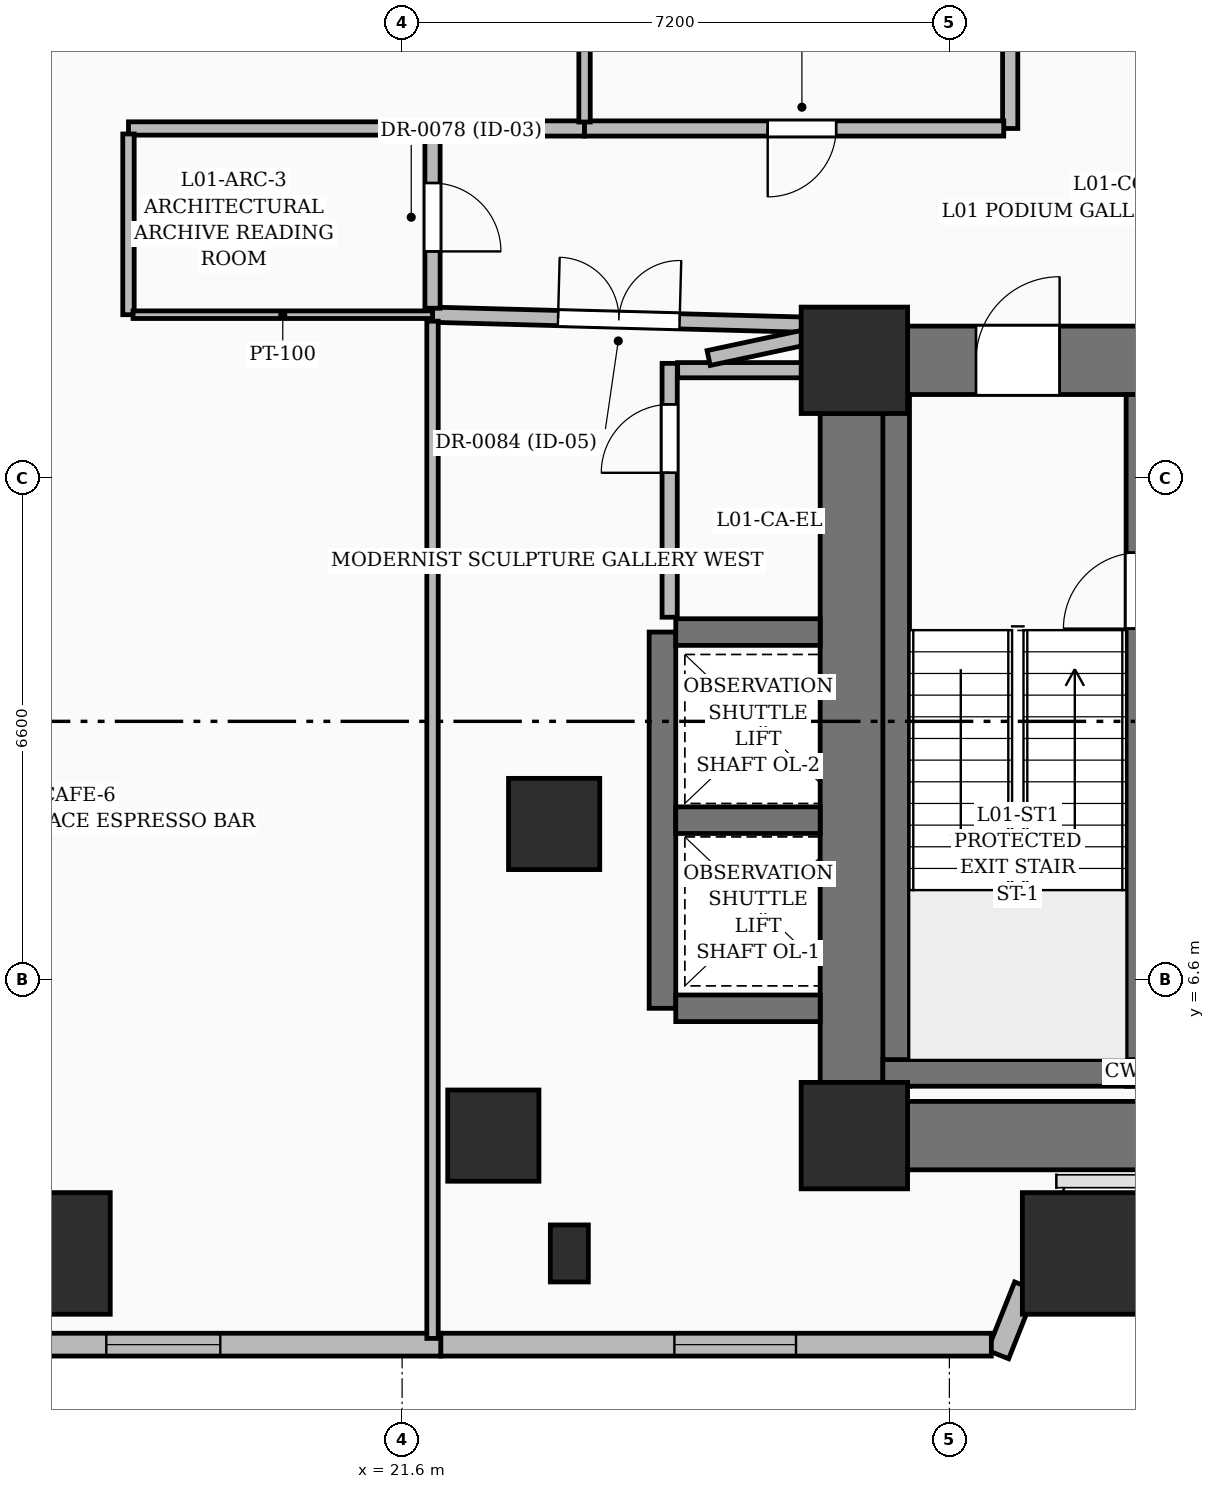
"""IFC4 building model, lengths in metres.
Left out: names, types, materials, properties, quantities, classifications, styles, units other than length and angle.
Written with IfcOpenShell. Run it as: python <this file> out.ifc"""

import sys

from ifc_helpers import new_model, si_unit, direction, frame, frame_2d, origin, origin_2d, place, context, subcontext, project, spatial, rectangle, extrude, element, fill, save


model = new_model("IFC4")
c1 = context("Model", 3, precision=1e-05, world=origin(), true_north=direction((0.0, 1.0)))
c2 = subcontext(c1, "Body", "Model", "MODEL_VIEW")
j1 = project(units=[si_unit("LENGTHUNIT", "METRE"), si_unit("PLANEANGLEUNIT", "RADIAN")], contexts=[c1])
p1 = place(None, origin())
s1 = spatial("IfcSite", under=j1, at=p1, CompositionType="ELEMENT")
p2 = place(p1, origin())
s2 = spatial("IfcBuilding", under=s1, at=p2, CompositionType="ELEMENT")
p3 = place(p2, frame((0.0, 0.0, 8.4)))
s3 = spatial("IfcBuildingStorey", under=s2, at=p3, CompositionType="ELEMENT", Elevation=8.4)
for number, where, z_axis, x_axis in (
    (1, (27.55, 4.55, 0.0), (0.0, 0.0, 1.0), (1.0, 0.0, 0.0)),
    (2, (27.55, 14.75, 0.0), (0.0, 0.0, 1.0), (1.0, 0.0, 0.0)),
):
    element("IfcColumn", number, at=place(p3, frame(where, z_axis=z_axis, x_axis=x_axis)), inside=s3, PredefinedType="COLUMN", context=c2, shape_type="SweptSolid", body=[
        extrude(rectangle(XDim=1.4, YDim=1.4, at=origin_2d()), origin(), (0.0, 0.0, 1.0), 4.5),
    ])
for number, where, z_axis, x_axis in (
    (3, (22.8, 4.55, 0.0), (0.0, 0.0, 1.0), (1.0, 0.0, 0.0)),
    (4, (23.6, 8.65, 0.0), (0.0, 0.0, 1.0), (1.0, 0.0, 0.0)),
):
    element("IfcColumn", number, at=place(p3, frame(where, z_axis=z_axis, x_axis=x_axis)), inside=s3, PredefinedType="COLUMN", context=c2, shape_type="SweptSolid", body=[
        extrude(rectangle(XDim=1.2, YDim=1.2, at=origin_2d()), origin(), (0.0, 0.0, 1.0), 4.5),
    ])
p4 = place(p3, frame((28.25, 4.55, 0.0), z_axis=(0.0, 0.0, 1.0), x_axis=(1.0, 0.0, 0.0)))
e5 = element("IfcWall", 5, at=p4, inside=s3, PredefinedType="SHEAR", context=c2, shape_type="SweptSolid", body=[
    extrude(rectangle(XDim=6.2, YDim=0.9, at=frame_2d((3.1, 0.0))), origin(), (0.0, 0.0, 1.0), 4.5),
])
p5 = place(p3, frame((28.25, 14.75, 0.0), z_axis=(0.0, 0.0, 1.0), x_axis=(1.0, 0.0, 0.0)))
e6 = element("IfcWall", 6, at=p5, inside=s3, PredefinedType="SHEAR", context=c2, shape_type="SweptSolid", body=[
    extrude(rectangle(XDim=6.2, YDim=0.9, at=frame_2d((3.1, 0.0))), origin(), (0.0, 0.0, 1.0), 4.5),
])
p6 = place(p5, frame((0.9, 0.0, 0.0)))
e7 = element("IfcOpeningElement", 7, at=p6, cuts=e6, PredefinedType="OPENING", context=c2, shape_type="SweptSolid", body=[
    extrude(rectangle(XDim=1.1, YDim=2.2, at=frame_2d((0.55, 1.1))), frame((0.0, 0.46, 0.0), z_axis=(0.0, -1.0, 0.0), x_axis=(1.0, 0.0, 0.0)), (0.0, 0.0, 1.0), 0.92),
])
p7 = place(p3, frame((27.55, 5.25, 0.0), z_axis=(0.0, 0.0, 1.0), x_axis=(0.0, 1.0, 0.0)))
e8 = element("IfcWall", 8, at=p7, inside=s3, PredefinedType="SHEAR", context=c2, shape_type="SweptSolid", body=[
    extrude(rectangle(XDim=8.8, YDim=0.9, at=frame_2d((4.4, 0.0))), origin(), (0.0, 0.0, 1.0), 4.5),
])
p8 = place(p3, frame((28.1, 5.2, 0.0), z_axis=(0.0, 0.0, 1.0), x_axis=(0.0, 1.0, 0.0)))
e9 = element("IfcWall", 9, at=p8, inside=s3, PredefinedType="SOLIDWALL", context=c2, shape_type="SweptSolid", body=[
    extrude(rectangle(XDim=9.1, YDim=0.35, at=frame_2d((4.55, 0.0))), origin(), (0.0, 0.0, 1.0), 4.5),
])
p9 = place(p3, frame((31.3, 5.2, 0.0), z_axis=(0.0, 0.0, 1.0), x_axis=(0.0, 1.0, 0.0)))
e10 = element("IfcWall", 10, at=p9, inside=s3, PredefinedType="SOLIDWALL", context=c2, shape_type="SweptSolid", body=[
    extrude(rectangle(XDim=9.1, YDim=0.35, at=frame_2d((4.55, 0.0))), origin(), (0.0, 0.0, 1.0), 4.5),
])
p10 = place(p9, frame((6.02, 0.0, 0.0)))
e11 = element("IfcOpeningElement", 11, at=p10, cuts=e10, PredefinedType="OPENING", context=c2, shape_type="SweptSolid", body=[
    extrude(rectangle(XDim=1.0, YDim=2.15, at=frame_2d((0.5, 1.075))), frame((0.0, 0.185, 0.0), z_axis=(0.0, -1.0, 0.0), x_axis=(1.0, 0.0, 0.0)), (0.0, 0.0, 1.0), 0.37),
])
p11 = place(p3, frame((27.925, 5.375, 0.0), z_axis=(0.0, 0.0, 1.0), x_axis=(1.0, 0.0, 0.0)))
e12 = element("IfcWall", 12, at=p11, inside=s3, PredefinedType="SOLIDWALL", context=c2, shape_type="SweptSolid", body=[
    extrude(rectangle(XDim=3.55, YDim=0.35, at=frame_2d((1.775, 0.0))), origin(), (0.0, 0.0, 1.0), 4.5),
])
p12 = place(p3, frame((25.025, 6.225, 0.0), z_axis=(0.0, 0.0, 1.0), x_axis=(0.0, 1.0, 0.0)))
e13 = element("IfcWall", 13, at=p12, inside=s3, PredefinedType="SOLIDWALL", context=c2, shape_type="SweptSolid", body=[
    extrude(rectangle(XDim=4.95, YDim=0.35, at=frame_2d((2.475, 0.0))), origin(), (0.0, 0.0, 1.0), 4.5),
])
for number, where, z_axis, x_axis in (
    (14, (25.2, 6.225, 0.0), (0.0, 0.0, 1.0), (1.0, 0.0, 0.0)),
    (15, (25.2, 8.7, 0.0), (0.0, 0.0, 1.0), (1.0, 0.0, 0.0)),
    (16, (25.2, 11.175, 0.0), (0.0, 0.0, 1.0), (1.0, 0.0, 0.0)),
):
    element("IfcWall", number, at=place(p3, frame(where, z_axis=z_axis, x_axis=x_axis)), inside=s3, PredefinedType="SOLIDWALL", context=c2, shape_type="SweptSolid", body=[
        extrude(rectangle(XDim=1.9, YDim=0.35, at=frame_2d((0.95, 0.0))), origin(), (0.0, 0.0, 1.0), 4.5),
    ])
for number, where, z_axis, x_axis in (
    (17, (16.96, 3.0, 0.0), (0.0, 0.0, 1.0), (1.0, 0.0, 0.0)),
    (18, (30.56, 3.0, 0.0), (0.0, 0.0, 1.0), (1.0, 0.0, 0.0)),
):
    element("IfcColumn", number, at=place(p3, frame(where, z_axis=z_axis, x_axis=x_axis)), inside=s3, PredefinedType="COLUMN", context=c2, shape_type="SweptSolid", body=[
        extrude(rectangle(XDim=1.6, YDim=1.6, at=origin_2d()), origin(), (0.0, 0.0, 1.0), 4.5),
    ])
p13 = place(p3, frame((23.8, 3.0, 0.0), z_axis=(0.0, 0.0, 1.0), x_axis=(1.0, 0.0, 0.0)))
e19 = element("IfcColumn", 19, at=p13, inside=s3, PredefinedType="PILASTER", context=c2, shape_type="SweptSolid", body=[
    extrude(rectangle(XDim=0.5, YDim=0.75, at=origin_2d()), origin(), (0.0, 0.0, 1.0), 4.5),
])
p14 = place(p3, frame((29.798, 2.57, 0.0), z_axis=(0.0, 0.0, 1.0), x_axis=(-0.369651063385, -0.929170647049, 0.0)))
e20 = element("IfcWall", 20, at=p14, inside=s3, PredefinedType="SOLIDWALL", context=c2, shape_type="SweptSolid", body=[
    extrude(rectangle(XDim=0.968, YDim=0.3, at=frame_2d((0.484, 0.0))), origin(), (0.0, 0.0, 1.0), 4.2),
])
p15 = place(p3, frame((29.352, 1.8, 0.0), z_axis=(0.0, 0.0, 1.0), x_axis=(-1.0, 0.0, 0.0)))
e21 = element("IfcWall", 21, at=p15, inside=s3, PredefinedType="SOLIDWALL", context=c2, shape_type="SweptSolid", body=[
    extrude(rectangle(XDim=7.244, YDim=0.3, at=frame_2d((3.622, 0.0))), origin(), (0.0, 0.0, 1.0), 4.2),
])
p16 = place(p15, frame((2.57, 0.0, 0.55)))
e22 = element("IfcOpeningElement", 22, at=p16, cuts=e21, PredefinedType="OPENING", context=c2, shape_type="SweptSolid", body=[
    extrude(rectangle(XDim=1.6, YDim=2.2, at=frame_2d((0.8, 1.1))), frame((0.0, 0.16, 0.0), z_axis=(0.0, -1.0, 0.0), x_axis=(1.0, 0.0, 0.0)), (0.0, 0.0, 1.0), 0.32),
])
p17 = place(p3, frame((22.108, 1.8, 0.0), z_axis=(0.0, 0.0, 1.0), x_axis=(-1.0, 0.0, 0.0)))
e23 = element("IfcWall", 23, at=p17, inside=s3, PredefinedType="SOLIDWALL", context=c2, shape_type="SweptSolid", body=[
    extrude(rectangle(XDim=7.524, YDim=0.3, at=frame_2d((3.762, 0.0))), origin(), (0.0, 0.0, 1.0), 4.2),
])
p18 = place(p17, frame((2.9, 0.0, 0.6)))
e24 = element("IfcOpeningElement", 24, at=p18, cuts=e23, PredefinedType="OPENING", context=c2, shape_type="SweptSolid", body=[
    extrude(rectangle(XDim=1.5, YDim=2.1, at=frame_2d((0.75, 1.05))), frame((0.0, 0.16, 0.0), z_axis=(0.0, -1.0, 0.0), x_axis=(1.0, 0.0, 0.0)), (0.0, 0.0, 1.0), 0.32),
])
p19 = place(p3, frame((25.12, 11.37, 0.0), z_axis=(0.0, 0.0, 1.0), x_axis=(0.0, 1.0, 0.0)))
e25 = element("IfcWall", 25, at=p19, inside=s3, PredefinedType="PARTITIONING", context=c2, shape_type="SweptSolid", body=[
    extrude(rectangle(XDim=3.34, YDim=0.2, at=frame_2d((1.67, 0.0))), origin(), (0.0, 0.0, 1.0), 4.2),
])
p20 = place(p19, frame((1.9, 0.0, 0.0)))
e26 = element("IfcOpeningElement", 26, at=p20, cuts=e25, PredefinedType="OPENING", context=c2, shape_type="SweptSolid", body=[
    extrude(rectangle(XDim=0.9, YDim=2.1, at=frame_2d((0.45, 1.05))), frame((0.0, 0.11, 0.0), z_axis=(0.0, -1.0, 0.0), x_axis=(1.0, 0.0, 0.0)), (0.0, 0.0, 1.0), 0.22),
])
p21 = place(p3, frame((25.225, 14.62, 0.0), z_axis=(0.0, 0.0, 1.0), x_axis=(1.0, 0.0, 0.0)))
e27 = element("IfcWall", 27, at=p21, inside=s3, PredefinedType="PARTITIONING", context=c2, shape_type="SweptSolid", body=[
    extrude(rectangle(XDim=1.86, YDim=0.2, at=frame_2d((0.93, 0.0))), origin(), (0.0, 0.0, 1.0), 4.2),
])
p22 = place(p3, frame((22.0, 15.35, 0.0), z_axis=(0.0, 0.0, 1.0), x_axis=(0.999640767954, -0.02680177314, 0.0)))
e28 = element("IfcWall", 28, at=p22, inside=s3, PredefinedType="PARTITIONING", context=c2, shape_type="SweptSolid", body=[
    extrude(rectangle(XDim=5.602, YDim=0.2, at=frame_2d((2.801, 0.0))), origin(), (0.0, 0.0, 1.0), 3.078),
])
p23 = place(p22, frame((1.652, 0.0, 0.0)))
e29 = element("IfcOpeningElement", 29, at=p23, cuts=e28, PredefinedType="OPENING", context=c2, shape_type="SweptSolid", body=[
    extrude(rectangle(XDim=1.6, YDim=2.3, at=frame_2d((0.8, 1.15))), frame((0.0, 0.11, 0.0), z_axis=(0.0, -1.0, 0.0), x_axis=(1.0, 0.0, 0.0)), (0.0, 0.0, 1.0), 0.22),
])
p24 = place(p3, frame((22.0, 17.8, 0.0), z_axis=(0.0, 0.0, 1.0), x_axis=(0.0, -1.0, 0.0)))
e30 = element("IfcWall", 30, at=p24, inside=s3, PredefinedType="PARTITIONING", context=c2, shape_type="SweptSolid", body=[
    extrude(rectangle(XDim=2.365, YDim=0.2, at=frame_2d((1.183, 0.0))), origin(), (0.0, 0.0, 1.0), 3.621),
])
p25 = place(p24, frame((0.717, 0.0, 0.0)))
e31 = element("IfcOpeningElement", 31, at=p25, cuts=e30, PredefinedType="OPENING", context=c2, shape_type="SweptSolid", body=[
    extrude(rectangle(XDim=0.9, YDim=2.1, at=frame_2d((0.45, 1.05))), frame((0.0, 0.11, 0.0), z_axis=(0.0, -1.0, 0.0), x_axis=(1.0, 0.0, 0.0)), (0.0, 0.0, 1.0), 0.22),
])
p26 = place(p3, frame((24.0, 17.8, 0.0), z_axis=(0.0, 0.0, 1.0), x_axis=(-1.0, 0.0, 0.0)))
e32 = element("IfcWall", 32, at=p26, inside=s3, PredefinedType="PARTITIONING", context=c2, shape_type="SweptSolid", body=[
    extrude(rectangle(XDim=1.915, YDim=0.2, at=frame_2d((0.958, 0.0))), origin(), (0.0, 0.0, 1.0), 3.078),
])
p27 = place(p3, frame((29.6, 21.8, 0.0), z_axis=(0.0, 0.0, 1.0), x_axis=(0.0, -1.0, 0.0)))
e33 = element("IfcWall", 33, at=p27, inside=s3, PredefinedType="PARTITIONING", context=c2, shape_type="SweptSolid", body=[
    extrude(rectangle(XDim=4.0, YDim=0.2, at=frame_2d((2.0, 0.0))), origin(), (0.0, 0.0, 1.0), 3.621),
])
p28 = place(p3, frame((29.515, 17.8, 0.0), z_axis=(0.0, 0.0, 1.0), x_axis=(-1.0, 0.0, 0.0)))
e34 = element("IfcWall", 34, at=p28, inside=s3, PredefinedType="PARTITIONING", context=c2, shape_type="SweptSolid", body=[
    extrude(rectangle(XDim=5.515, YDim=0.2, at=frame_2d((2.757, 0.0))), origin(), (0.0, 0.0, 1.0), 3.078),
])
p29 = place(p28, frame((2.205, 0.0, 0.0)))
e35 = element("IfcOpeningElement", 35, at=p29, cuts=e34, PredefinedType="OPENING", context=c2, shape_type="SweptSolid", body=[
    extrude(rectangle(XDim=0.9, YDim=2.1, at=frame_2d((0.45, 1.05))), frame((0.0, 0.11, 0.0), z_axis=(0.0, -1.0, 0.0), x_axis=(1.0, 0.0, 0.0)), (0.0, 0.0, 1.0), 0.22),
])
p30 = place(p3, frame((22.0, 15.265, 0.0), z_axis=(0.0, 0.0, 1.0), x_axis=(0.0, -1.0, 0.0)))
e36 = element("IfcWall", 36, at=p30, inside=s3, PredefinedType="PARTITIONING", context=c2, shape_type="SweptSolid", body=[
    extrude(rectangle(XDim=13.383, YDim=0.15, at=frame_2d((6.691, 0.0))), origin(), (0.0, 0.0, 1.0), 2.97),
])
p31 = place(p3, frame((21.915, 17.8, 0.0), z_axis=(0.0, 0.0, 1.0), x_axis=(-1.0, 0.0, 0.0)))
e37 = element("IfcWall", 37, at=p31, inside=s3, PredefinedType="PARTITIONING", context=c2, shape_type="SweptSolid", body=[
    extrude(rectangle(XDim=3.915, YDim=0.175, at=frame_2d((1.958, 0.0))), origin(), (0.0, 0.0, 1.0), 3.621),
])
p32 = place(p3, frame((18.0, 17.728, 0.0), z_axis=(0.0, 0.0, 1.0), x_axis=(0.0, -1.0, 0.0)))
e38 = element("IfcWall", 38, at=p32, inside=s3, PredefinedType="PARTITIONING", context=c2, shape_type="SweptSolid", body=[
    extrude(rectangle(XDim=2.377, YDim=0.15, at=frame_2d((1.189, 0.0))), origin(), (0.0, 0.0, 1.0), 3.621),
])
p33 = place(p3, frame((18.06, 15.35, 0.0), z_axis=(0.0, 0.0, 1.0), x_axis=(1.0, 0.0, 0.0)))
e39 = element("IfcWall", 39, at=p33, inside=s3, PredefinedType="PARTITIONING", context=c2, shape_type="SweptSolid", body=[
    extrude(rectangle(XDim=3.94, YDim=0.1, at=frame_2d((1.97, 0.0))), origin(), (0.0, 0.0, 1.0), 3.621),
])
p34 = place(p3, frame((24.0, 17.885, 0.0), z_axis=(0.0, 0.0, 1.0), x_axis=(0.0, 1.0, 0.0)))
e40 = element("IfcWall", 40, at=p34, inside=s3, PredefinedType="PARTITIONING", context=c2, shape_type="SweptSolid", body=[
    extrude(rectangle(XDim=3.915, YDim=0.15, at=frame_2d((1.958, 0.0))), origin(), (0.0, 0.0, 1.0), 3.078),
])
p35 = place(p3, frame((25.633, 14.78, 0.0), z_axis=(0.0, 0.0, 1.0), x_axis=(0.977912383678, 0.20901523832, 0.0)))
e41 = element("IfcWall", 41, at=p35, inside=s3, PredefinedType="PARTITIONING", context=c2, shape_type="SweptSolid", body=[
    extrude(rectangle(XDim=1.33, YDim=0.2, at=frame_2d((0.665, 0.0))), origin(), (0.0, 0.0, 1.0), 3.078),
])
p36 = place(p16, origin())
e42 = element("IfcWindow", 42, at=p36, inside=s3, PartitioningType="SINGLE_PANEL", PredefinedType="WINDOW", context=c2, shape_type="SweptSolid", body=[
    extrude(rectangle(XDim=1.6, YDim=2.2, at=frame_2d((0.8, 1.1))), frame((0.0, 0.03, 0.0), z_axis=(0.0, -1.0, 0.0), x_axis=(1.0, 0.0, 0.0)), (0.0, 0.0, 1.0), 0.06),
])
fill(e22, e42)
p37 = place(p18, origin())
e43 = element("IfcWindow", 43, at=p37, inside=s3, PartitioningType="SINGLE_PANEL", PredefinedType="WINDOW", context=c2, shape_type="SweptSolid", body=[
    extrude(rectangle(XDim=1.5, YDim=2.1, at=frame_2d((0.75, 1.05))), frame((0.0, 0.03, 0.0), z_axis=(0.0, -1.0, 0.0), x_axis=(1.0, 0.0, 0.0)), (0.0, 0.0, 1.0), 0.06),
])
fill(e24, e43)
p38 = place(p6, origin())
e44 = element("IfcDoor", 44, at=p38, inside=s3, OperationType="SINGLE_SWING_RIGHT", PredefinedType="DOOR", context=c2, shape_type="SweptSolid", body=[
    extrude(rectangle(XDim=1.1, YDim=2.2, at=frame_2d((0.55, 1.1))), frame((0.0, 0.025, 0.0), z_axis=(0.0, -1.0, 0.0), x_axis=(1.0, 0.0, 0.0)), (0.0, 0.0, 1.0), 0.05),
])
fill(e7, e44)
p39 = place(p20, origin())
e45 = element("IfcDoor", 45, at=p39, inside=s3, OperationType="SINGLE_SWING_LEFT", PredefinedType="DOOR", context=c2, shape_type="SweptSolid", body=[
    extrude(rectangle(XDim=0.9, YDim=2.1, at=frame_2d((0.45, 1.05))), frame((0.0, 0.025, 0.0), z_axis=(0.0, -1.0, 0.0), x_axis=(1.0, 0.0, 0.0)), (0.0, 0.0, 1.0), 0.05),
])
fill(e26, e45)
p40 = place(p25, origin())
e46 = element("IfcDoor", 46, at=p40, inside=s3, OperationType="SINGLE_SWING_RIGHT", PredefinedType="DOOR", context=c2, shape_type="SweptSolid", body=[
    extrude(rectangle(XDim=0.9, YDim=2.1, at=frame_2d((0.45, 1.05))), frame((0.0, 0.025, 0.0), z_axis=(0.0, -1.0, 0.0), x_axis=(1.0, 0.0, 0.0)), (0.0, 0.0, 1.0), 0.05),
])
fill(e31, e46)
p41 = place(p29, origin())
e47 = element("IfcDoor", 47, at=p41, inside=s3, OperationType="SINGLE_SWING_RIGHT", PredefinedType="DOOR", context=c2, shape_type="SweptSolid", body=[
    extrude(rectangle(XDim=0.9, YDim=2.1, at=frame_2d((0.45, 1.05))), frame((0.0, 0.025, 0.0), z_axis=(0.0, -1.0, 0.0), x_axis=(1.0, 0.0, 0.0)), (0.0, 0.0, 1.0), 0.05),
])
fill(e35, e47)
p42 = place(p23, origin())
e48 = element("IfcDoor", 48, at=p42, inside=s3, OperationType="DOUBLE_DOOR_SINGLE_SWING", PredefinedType="DOOR", context=c2, shape_type="SweptSolid", body=[
    extrude(rectangle(XDim=1.6, YDim=2.3, at=frame_2d((0.8, 1.15))), frame((0.0, 0.025, 0.0), z_axis=(0.0, -1.0, 0.0), x_axis=(1.0, 0.0, 0.0)), (0.0, 0.0, 1.0), 0.05),
])
fill(e29, e48)
save(model, sys.argv[1])
